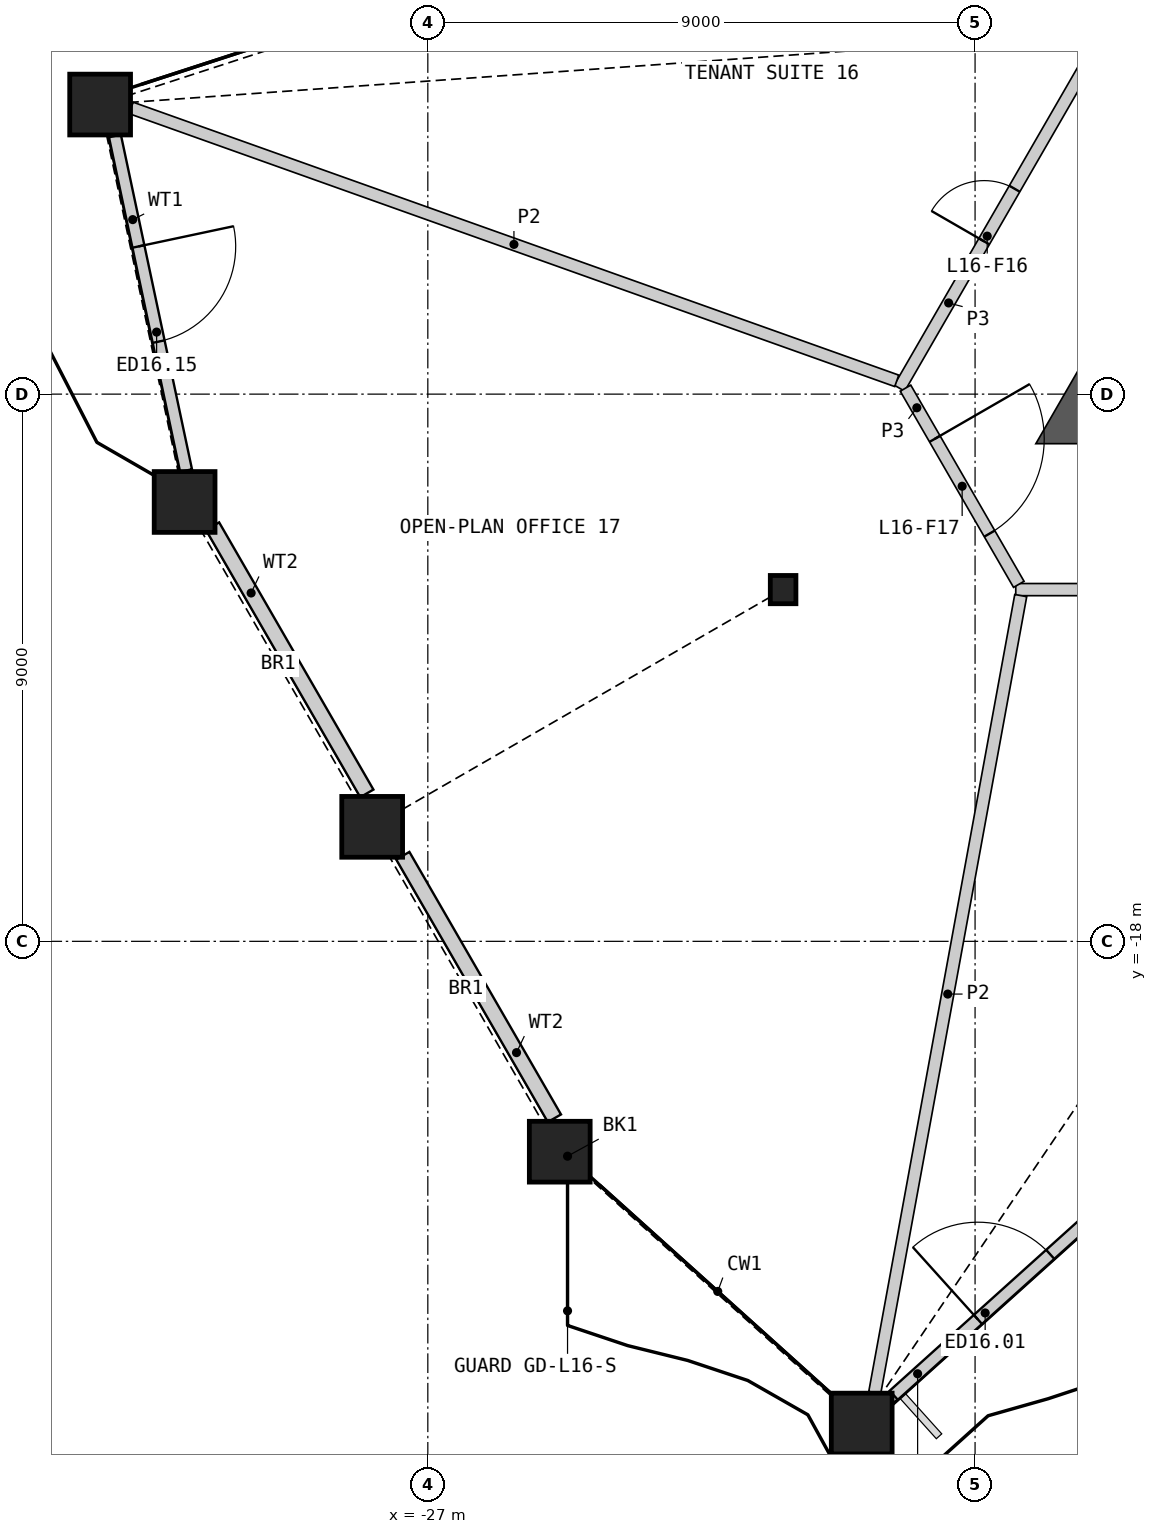
"""IFC4 building model, lengths in metres.
Left out: names, types, materials, properties, quantities, classifications, styles, units other than length and angle.
Written with IfcOpenShell. Run it as: python <this file> out.ifc"""

import sys

from ifc_helpers import new_model, si_unit, direction, frame, frame_2d, origin, origin_2d, place, context, subcontext, project, spatial, polyline, rectangle, hollow_rectangle, i_section, outline, extrude, element, fill, save


model = new_model("IFC4")
c1 = context("Model", 3, precision=1e-05, world=origin(), true_north=direction((0.0, 1.0)))
c2 = subcontext(c1, "Body", "Model", "MODEL_VIEW")
j1 = project(units=[si_unit("LENGTHUNIT", "METRE"), si_unit("PLANEANGLEUNIT", "RADIAN")], contexts=[c1])
p1 = place(None, origin())
s1 = spatial("IfcSite", under=j1, at=p1, CompositionType="ELEMENT")
p2 = place(p1, origin())
s2 = spatial("IfcBuilding", under=s1, at=p2, CompositionType="ELEMENT")
p3 = place(p2, frame((0.0, 0.0, 76.2)))
s3 = spatial("IfcBuildingStorey", under=s2, at=p3, CompositionType="ELEMENT", Elevation=76.2)
for number, where, z_axis, x_axis in (
    (1, (-24.83, -21.46, 0.0), (0.0, 0.0, 1.0), (1.0, 0.0, 0.0)),
    (2, (-19.864, -25.931, 0.0), (0.0, 0.0, 1.0), (1.0, 0.0, 0.0)),
    (3, (-32.389, -4.237, 0.0), (0.0, 0.0, 1.0), (1.0, 0.0, 0.0)),
    (4, (-31.0, -10.774, 0.0), (0.0, 0.0, 1.0), (1.0, 0.0, 0.0)),
    (5, (-27.915, -16.117, 0.0), (0.0, 0.0, 1.0), (1.0, 0.0, 0.0)),
):
    element("IfcColumn", number, at=place(p3, frame(where, z_axis=z_axis, x_axis=x_axis)), inside=s3, PredefinedType="COLUMN", context=c2, shape_type="SweptSolid", body=[
        extrude(hollow_rectangle(XDim=1.0, YDim=1.0, WallThickness=0.07, at=origin_2d()), origin(), (0.0, 0.0, 1.0), 4.2),
    ])
p4 = place(p3, frame((-21.157, -12.215, 0.0), z_axis=(0.0, 0.0, 1.0), x_axis=(1.0, 0.0, 0.0)))
e6 = element("IfcColumn", 6, at=p4, inside=s3, PredefinedType="COLUMN", context=c2, shape_type="SweptSolid", body=[
    extrude(i_section(OverallWidth=0.421, OverallDepth=0.465, WebThickness=0.045, FlangeThickness=0.072, at=origin_2d()), origin(), (0.0, 0.0, 1.0), 4.2),
])
p5 = place(p3, frame((-19.337, -25.466, 0.0), z_axis=(0.0, 0.0, 1.0), x_axis=(0.743124116755, 0.669153605009, 0.0)))
e7 = element("IfcWall", 7, at=p5, inside=s3, PredefinedType="SOLIDWALL", context=c2, shape_type="SweptSolid", body=[
    extrude(rectangle(XDim=5.284, YDim=0.2, at=frame_2d((2.642, 0.0))), origin(), (0.0, 0.0, 1.0), 3.189),
])
p6 = place(p5, frame((1.863, 0.0, 0.0)))
e8 = element("IfcOpeningElement", 8, at=p6, cuts=e7, PredefinedType="OPENING", context=c2, shape_type="SweptSolid", body=[
    extrude(rectangle(XDim=1.6, YDim=2.4, at=frame_2d((0.8, 1.2))), frame((0.0, 0.11, 0.0), z_axis=(0.0, -1.0, 0.0), x_axis=(1.0, 0.0, 0.0)), (0.0, 0.0, 1.0), 0.22),
])
p7 = place(p3, frame((-32.146, -4.754, 0.0), z_axis=(0.0, 0.0, 1.0), x_axis=(0.207901831982, -0.978149696242, 0.0)))
e9 = element("IfcWall", 9, at=p7, inside=s3, PredefinedType="SOLIDWALL", context=c2, shape_type="SweptSolid", body=[
    extrude(rectangle(XDim=5.626, YDim=0.2, at=frame_2d((2.813, 0.0))), origin(), (0.0, 0.0, 1.0), 3.189),
])
p8 = place(p7, frame((1.858, 0.0, 0.0)))
e10 = element("IfcOpeningElement", 10, at=p8, cuts=e9, PredefinedType="OPENING", context=c2, shape_type="SweptSolid", body=[
    extrude(rectangle(XDim=1.6, YDim=2.4, at=frame_2d((0.8, 1.2))), frame((0.0, 0.11, 0.0), z_axis=(0.0, -1.0, 0.0), x_axis=(1.0, 0.0, 0.0)), (0.0, 0.0, 1.0), 0.22),
])
p9 = place(p3, frame((-30.54, -11.172, 0.0), z_axis=(0.0, 0.0, 1.0), x_axis=(0.500004250643, -0.866022949661, 0.0)))
e11 = element("IfcWall", 11, at=p9, inside=s3, PredefinedType="SOLIDWALL", context=c2, shape_type="SweptSolid", body=[
    extrude(rectangle(XDim=5.075, YDim=0.25, at=frame_2d((2.537, 0.0))), origin(), (0.0, 0.0, 1.0), 3.189),
])
p10 = place(p3, frame((-27.411, -16.592, 0.0), z_axis=(0.0, 0.0, 1.0), x_axis=(0.499978178329, -0.866038002165, 0.0)))
e12 = element("IfcWall", 12, at=p10, inside=s3, PredefinedType="SOLIDWALL", context=c2, shape_type="SweptSolid", body=[
    extrude(rectangle(XDim=4.986, YDim=0.25, at=frame_2d((2.493, 0.0))), origin(), (0.0, 0.0, 1.0), 3.189),
])
p11 = place(p3, origin())
e13 = element("IfcWall", 13, at=p11, inside=s3, PredefinedType="SHEAR", context=c2, shape_type="SweptSolid", body=[
    extrude(outline(polyline([(-16.221, -8.465), (-15.441, -8.915), (-15.441, -9.815), (-17.0, -9.815), (-16.221, -8.465)])), origin(), (0.0, 0.0, 1.0), 3.8),
])
p12 = place(p3, frame((-17.331, -12.215, 0.0), z_axis=(0.0, 0.0, 1.0), x_axis=(1.0, 0.0, 0.0)))
e14 = element("IfcWall", 14, at=p12, inside=s3, PredefinedType="PARTITIONING", context=c2, shape_type="SweptSolid", body=[
    extrude(rectangle(XDim=6.51, YDim=0.2, at=frame_2d((3.255, 0.0))), origin(), (0.0, 0.0, 1.0), 3.8),
])
p13 = place(p3, frame((-19.244, -8.902, 0.0), z_axis=(0.0, 0.0, 1.0), x_axis=(0.499984737558, 0.86603421538, 0.0)))
e15 = element("IfcWall", 15, at=p13, inside=s3, PredefinedType="PARTITIONING", context=c2, shape_type="SweptSolid", body=[
    extrude(rectangle(XDim=6.473, YDim=0.2, at=frame_2d((3.236, 0.0))), origin(), (0.0, 0.0, 1.0), 3.8),
])
p14 = place(p13, frame((2.787, 0.0, 0.0)))
e16 = element("IfcOpeningElement", 16, at=p14, cuts=e15, PredefinedType="OPENING", context=c2, shape_type="SweptSolid", body=[
    extrude(rectangle(XDim=1.0, YDim=2.1, at=frame_2d((0.5, 1.05))), frame((0.0, 0.11, 0.0), z_axis=(0.0, -1.0, 0.0), x_axis=(1.0, 0.0, 0.0)), (0.0, 0.0, 1.0), 0.22),
])
p15 = place(p3, frame((-19.144, -8.902, 0.0), z_axis=(0.0, 0.0, 1.0), x_axis=(0.499958791762, -0.866049194065, 0.0)))
e17 = element("IfcWall", 17, at=p15, inside=s3, PredefinedType="PARTITIONING", context=c2, shape_type="SweptSolid", body=[
    extrude(rectangle(XDim=3.726, YDim=0.2, at=frame_2d((1.863, 0.0))), origin(), (0.0, 0.0, 1.0), 3.8),
])
p16 = place(p15, frame((0.963, 0.0, 0.0)))
e18 = element("IfcOpeningElement", 18, at=p16, cuts=e17, PredefinedType="OPENING", context=c2, shape_type="SweptSolid", body=[
    extrude(rectangle(XDim=1.8, YDim=2.1, at=frame_2d((0.9, 1.05))), frame((0.0, 0.11, 0.0), z_axis=(0.0, -1.0, 0.0), x_axis=(1.0, 0.0, 0.0)), (0.0, 0.0, 1.0), 0.22),
])
p17 = place(p3, frame((-31.879, -4.293, 0.0), z_axis=(0.0, 0.0, 1.0), x_axis=(0.94194008836, -0.33578098508, 0.0)))
e19 = element("IfcWall", 19, at=p17, inside=s3, PredefinedType="PARTITIONING", context=c2, shape_type="SweptSolid", body=[
    extrude(rectangle(XDim=13.367, YDim=0.2, at=frame_2d((6.684, 0.0))), origin(), (0.0, 0.0, 1.0), 2.885),
])
p18 = place(p3, frame((-19.65, -25.421, 0.0), z_axis=(0.0, 0.0, 1.0), x_axis=(0.180179866985, 0.983633679544, 0.0)))
e20 = element("IfcWall", 20, at=p18, inside=s3, PredefinedType="PARTITIONING", context=c2, shape_type="SweptSolid", body=[
    extrude(rectangle(XDim=13.326, YDim=0.2, at=frame_2d((6.663, 0.0))), origin(), (0.0, 0.0, 1.0), 2.885),
])
p19 = place(p6, origin())
e21 = element("IfcDoor", 21, at=p19, inside=s3, OperationType="DOUBLE_DOOR_SINGLE_SWING", PredefinedType="DOOR", context=c2, shape_type="SweptSolid", body=[
    extrude(rectangle(XDim=1.6, YDim=2.4, at=frame_2d((0.8, 1.2))), frame((0.0, 0.025, 0.0), z_axis=(0.0, -1.0, 0.0), x_axis=(1.0, 0.0, 0.0)), (0.0, 0.0, 1.0), 0.05),
])
fill(e8, e21)
p20 = place(p8, origin())
e22 = element("IfcDoor", 22, at=p20, inside=s3, OperationType="DOUBLE_DOOR_SINGLE_SWING", PredefinedType="DOOR", context=c2, shape_type="SweptSolid", body=[
    extrude(rectangle(XDim=1.6, YDim=2.4, at=frame_2d((0.8, 1.2))), frame((0.0, 0.025, 0.0), z_axis=(0.0, -1.0, 0.0), x_axis=(1.0, 0.0, 0.0)), (0.0, 0.0, 1.0), 0.05),
])
fill(e10, e22)
p21 = place(p14, origin())
e23 = element("IfcDoor", 23, at=p21, inside=s3, OperationType="SINGLE_SWING_LEFT", PredefinedType="DOOR", context=c2, shape_type="SweptSolid", body=[
    extrude(rectangle(XDim=1.0, YDim=2.1, at=frame_2d((0.5, 1.05))), frame((0.0, 0.025, 0.0), z_axis=(0.0, -1.0, 0.0), x_axis=(1.0, 0.0, 0.0)), (0.0, 0.0, 1.0), 0.05),
])
fill(e16, e23)
p22 = place(p16, origin())
e24 = element("IfcDoor", 24, at=p22, inside=s3, OperationType="DOUBLE_DOOR_SINGLE_SWING", PredefinedType="DOOR", context=c2, shape_type="SweptSolid", body=[
    extrude(rectangle(XDim=1.8, YDim=2.1, at=frame_2d((0.9, 1.05))), frame((0.0, 0.025, 0.0), z_axis=(0.0, -1.0, 0.0), x_axis=(1.0, 0.0, 0.0)), (0.0, 0.0, 1.0), 0.05),
])
fill(e18, e24)
save(model, sys.argv[1])
